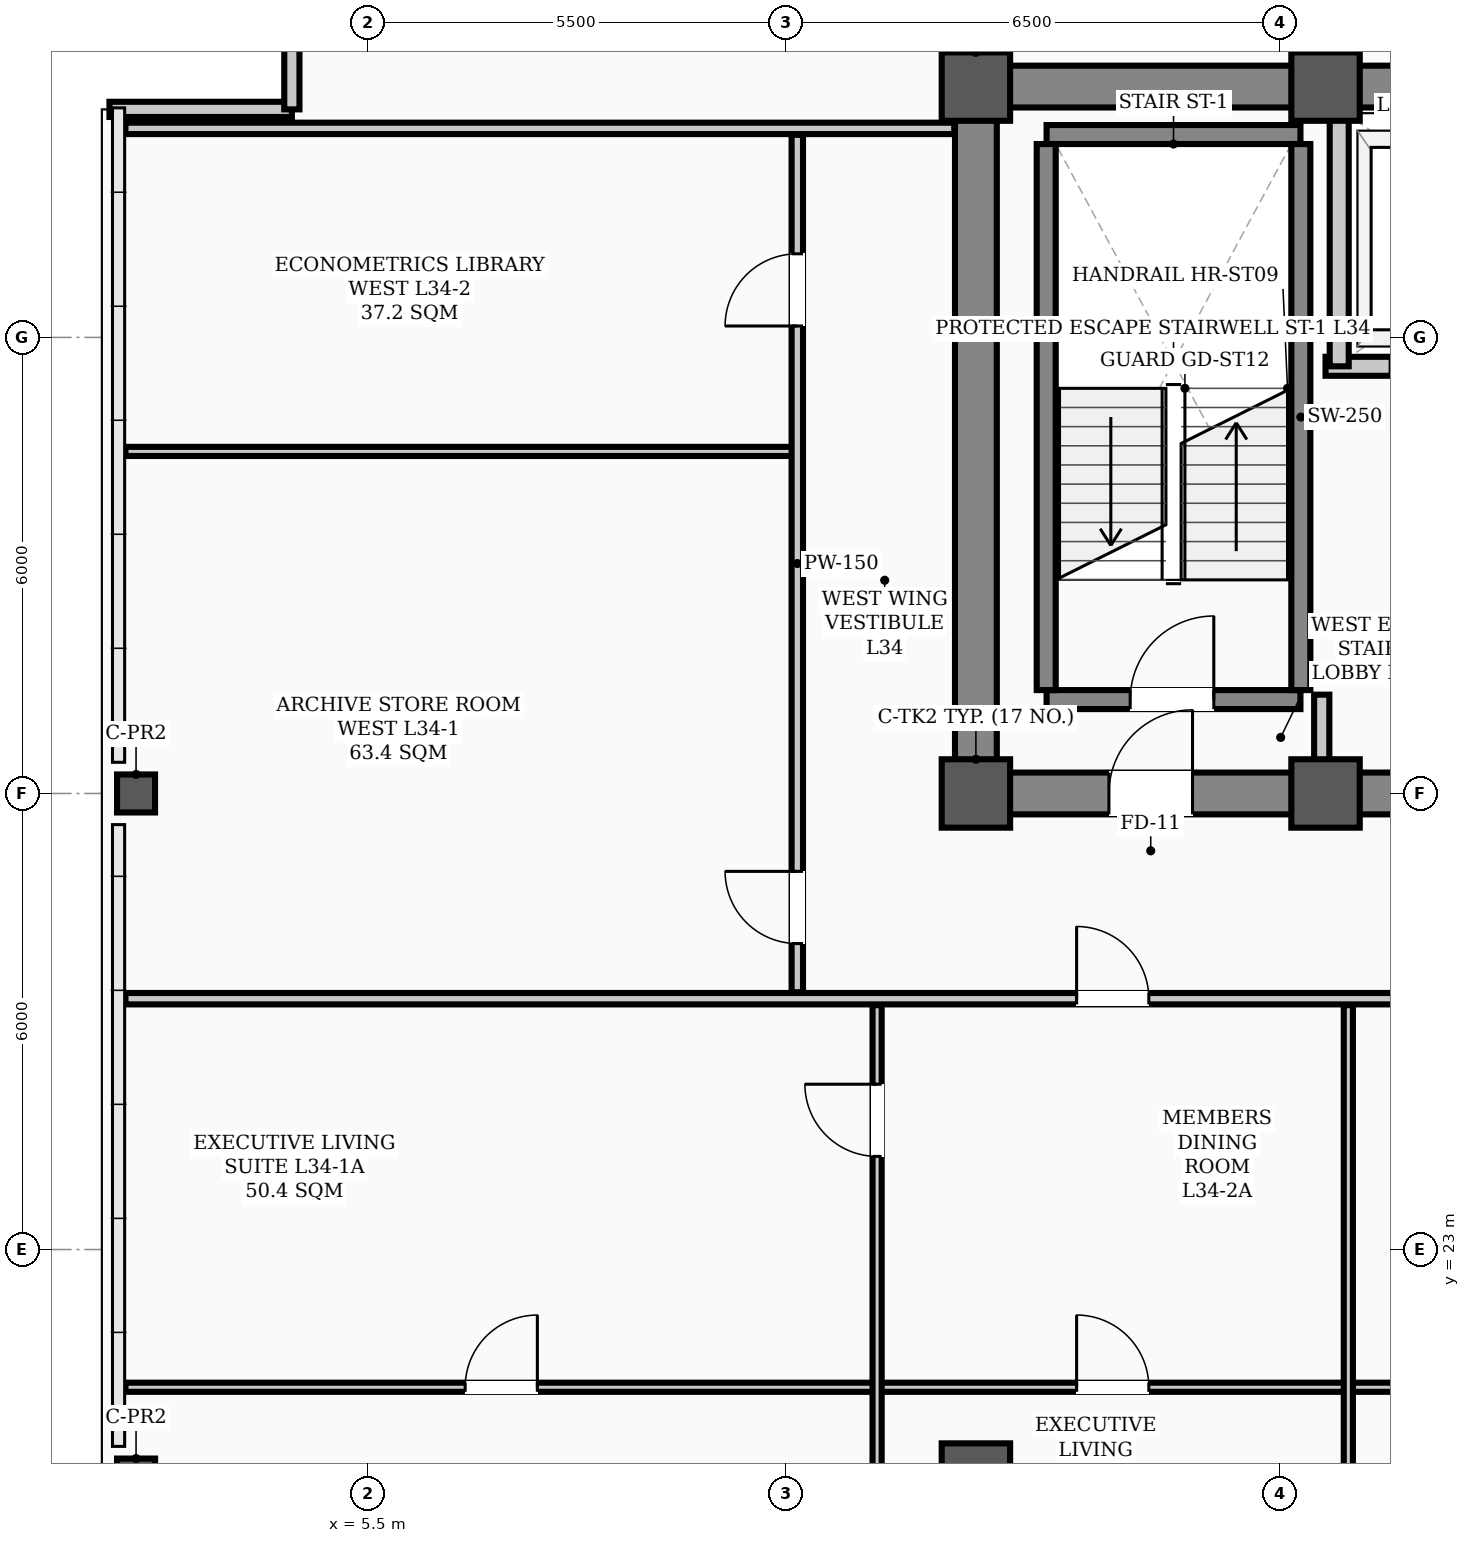
"""IFC4 building model, lengths in metres.
Left out: names, types, materials, properties, quantities, classifications, styles, units other than length and angle.
Written with IfcOpenShell. Run it as: python <this file> out.ifc"""

import sys

from ifc_helpers import new_model, si_unit, direction, frame, frame_2d, origin, origin_2d, place, context, subcontext, project, spatial, rectangle, hollow_rectangle, extrude, element, fill, save


model = new_model("IFC4")
c1 = context("Model", 3, precision=1e-05, world=origin(), true_north=direction((0.0, 1.0)))
c2 = subcontext(c1, "Body", "Model", "MODEL_VIEW")
j1 = project(units=[si_unit("LENGTHUNIT", "METRE"), si_unit("PLANEANGLEUNIT", "RADIAN")], contexts=[c1])
p1 = place(None, origin())
s1 = spatial("IfcSite", under=j1, at=p1, CompositionType="ELEMENT")
p2 = place(p1, origin())
s2 = spatial("IfcBuilding", under=s1, at=p2, CompositionType="ELEMENT")
p3 = place(p2, frame((0.0, 0.0, 138.3)))
s3 = spatial("IfcBuildingStorey", under=s2, at=p3, CompositionType="ELEMENT", Elevation=138.3)
for number, where, z_axis, x_axis in (
    (1, (13.5, 29.0, 0.0), (0.0, 0.0, 1.0), (1.0, 0.0, 0.0)),
    (2, (13.5, 38.3, 0.0), (0.0, 0.0, 1.0), (1.0, 0.0, 0.0)),
    (3, (18.1, 29.0, 0.0), (0.0, 0.0, 1.0), (1.0, 0.0, 0.0)),
    (4, (18.1, 38.3, 0.0), (0.0, 0.0, 1.0), (1.0, 0.0, 0.0)),
    (5, (13.5, 20.0, 0.0), (0.0, 0.0, 1.0), (1.0, 0.0, 0.0)),
):
    element("IfcColumn", number, at=place(p3, frame(where, z_axis=z_axis, x_axis=x_axis)), inside=s3, PredefinedType="COLUMN", context=c2, shape_type="SweptSolid", body=[
        extrude(hollow_rectangle(XDim=0.9, YDim=0.9, WallThickness=0.035, InnerFilletRadius=0.017, OuterFilletRadius=0.052, at=origin_2d()), origin(), (0.0, 0.0, 1.0), 3.9),
    ])
for number, where, z_axis, x_axis in (
    (6, (2.45, 20.0, 0.0), (0.0, 0.0, 1.0), (1.0, 0.0, 0.0)),
    (7, (2.45, 29.0, 0.0), (0.0, 0.0, 1.0), (1.0, 0.0, 0.0)),
):
    element("IfcColumn", number, at=place(p3, frame(where, z_axis=z_axis, x_axis=x_axis)), inside=s3, PredefinedType="COLUMN", context=c2, shape_type="SweptSolid", body=[
        extrude(hollow_rectangle(XDim=0.5, YDim=0.5, WallThickness=0.024, InnerFilletRadius=0.012, OuterFilletRadius=0.036, at=origin_2d()), origin(), (0.0, 0.0, 1.0), 3.9),
    ])
for number, where, z_axis, x_axis in (
    (8, (2.1, 38.0, 0.0), (0.0, 0.0, 1.0), (1.0, 0.0, 0.0)),
    (9, (4.5, 38.0, 0.0), (0.0, 0.0, 1.0), (0.0, 1.0, 0.0)),
):
    element("IfcWall", number, at=place(p3, frame(where, z_axis=z_axis, x_axis=x_axis)), inside=s3, PredefinedType="PARAPET", context=c2, shape_type="SweptSolid", body=[
        extrude(rectangle(XDim=2.4, YDim=0.2, at=frame_2d((1.2, 0.0))), origin(), (0.0, 0.0, 1.0), 1.2),
    ])
p4 = place(p3, frame((13.5, 29.0, 0.0), z_axis=(0.0, 0.0, 1.0), x_axis=(1.0, 0.0, 0.0)))
e10 = element("IfcWall", 10, at=p4, inside=s3, PredefinedType="SHEAR", context=c2, shape_type="SweptSolid", body=[
    extrude(rectangle(XDim=30.5, YDim=0.55, at=frame_2d((15.25, 0.0))), origin(), (0.0, 0.0, 1.0), 3.66),
])
p5 = place(p4, frame((1.75, 0.0, 0.0)))
e11 = element("IfcOpeningElement", 11, at=p5, cuts=e10, PredefinedType="OPENING", context=c2, shape_type="SweptSolid", body=[
    extrude(rectangle(XDim=1.1, YDim=2.08, at=frame_2d((0.55, 1.04))), frame((0.0, 0.285, 0.0), z_axis=(0.0, -1.0, 0.0), x_axis=(1.0, 0.0, 0.0)), (0.0, 0.0, 1.0), 0.57),
])
p6 = place(p4, frame((26.7, 0.0, 0.0)))
e12 = element("IfcOpeningElement", 12, at=p6, cuts=e10, PredefinedType="OPENING", context=c2, shape_type="SweptSolid", body=[
    extrude(rectangle(XDim=1.1, YDim=2.08, at=frame_2d((0.55, 1.04))), frame((0.0, 0.285, 0.0), z_axis=(0.0, -1.0, 0.0), x_axis=(1.0, 0.0, 0.0)), (0.0, 0.0, 1.0), 0.57),
])
p7 = place(p4, frame((6.8, 0.0, 0.0)))
e13 = element("IfcOpeningElement", 13, at=p7, cuts=e10, PredefinedType="OPENING", context=c2, shape_type="SweptSolid", body=[
    extrude(rectangle(XDim=1.1, YDim=2.08, at=frame_2d((0.55, 1.04))), frame((0.0, 0.285, 0.0), z_axis=(0.0, -1.0, 0.0), x_axis=(1.0, 0.0, 0.0)), (0.0, 0.0, 1.0), 0.57),
])
p8 = place(p4, frame((13.2, 0.0, 0.0)))
e14 = element("IfcOpeningElement", 14, at=p8, cuts=e10, PredefinedType="OPENING", context=c2, shape_type="SweptSolid", body=[
    extrude(rectangle(XDim=1.6, YDim=2.08, at=frame_2d((0.8, 1.04))), frame((0.0, 0.285, 0.0), z_axis=(0.0, -1.0, 0.0), x_axis=(1.0, 0.0, 0.0)), (0.0, 0.0, 1.0), 0.57),
])
p9 = place(p4, frame((20.525, 0.0, 0.0)))
e15 = element("IfcOpeningElement", 15, at=p9, cuts=e10, PredefinedType="OPENING", context=c2, shape_type="SweptSolid", body=[
    extrude(rectangle(XDim=0.95, YDim=2.08, at=frame_2d((0.475, 1.04))), frame((0.0, 0.285, 0.0), z_axis=(0.0, -1.0, 0.0), x_axis=(1.0, 0.0, 0.0)), (0.0, 0.0, 1.0), 0.57),
])
p10 = place(p3, frame((13.5, 38.3, 0.0), z_axis=(0.0, 0.0, 1.0), x_axis=(1.0, 0.0, 0.0)))
e16 = element("IfcWall", 16, at=p10, inside=s3, PredefinedType="SHEAR", context=c2, shape_type="SweptSolid", body=[
    extrude(rectangle(XDim=30.5, YDim=0.55, at=frame_2d((15.25, 0.0))), origin(), (0.0, 0.0, 1.0), 3.66),
])
p11 = place(p3, frame((13.5, 29.35, 0.0), z_axis=(0.0, 0.0, 1.0), x_axis=(0.0, 1.0, 0.0)))
e17 = element("IfcWall", 17, at=p11, inside=s3, PredefinedType="SHEAR", context=c2, shape_type="SweptSolid", body=[
    extrude(rectangle(XDim=8.6, YDim=0.55, at=frame_2d((4.3, 0.0))), origin(), (0.0, 0.0, 1.0), 3.66),
])
p12 = place(p3, frame((14.43, 30.235, 0.0), z_axis=(0.0, 0.0, 1.0), x_axis=(1.0, 0.0, 0.0)))
e18 = element("IfcWall", 18, at=p12, inside=s3, PredefinedType="STANDARD", context=c2, shape_type="SweptSolid", body=[
    extrude(rectangle(XDim=3.34, YDim=0.25, at=frame_2d((1.67, 0.0))), origin(), (0.0, 0.0, 1.0), 3.66),
])
p13 = place(p12, frame((1.1, 0.0, 0.0)))
e19 = element("IfcOpeningElement", 19, at=p13, cuts=e18, PredefinedType="OPENING", context=c2, shape_type="SweptSolid", body=[
    extrude(rectangle(XDim=1.1, YDim=2.08, at=frame_2d((0.55, 1.04))), frame((0.0, 0.135, 0.0), z_axis=(0.0, -1.0, 0.0), x_axis=(1.0, 0.0, 0.0)), (0.0, 0.0, 1.0), 0.27),
])
p14 = place(p3, frame((14.43, 37.669, 0.0), z_axis=(0.0, 0.0, 1.0), x_axis=(1.0, 0.0, 0.0)))
e20 = element("IfcWall", 20, at=p14, inside=s3, PredefinedType="STANDARD", context=c2, shape_type="SweptSolid", body=[
    extrude(rectangle(XDim=3.34, YDim=0.25, at=frame_2d((1.67, 0.0))), origin(), (0.0, 0.0, 1.0), 3.66),
])
for number, where, z_axis, x_axis in (
    (21, (14.425, 30.36, 0.0), (0.0, 0.0, 1.0), (0.0, 1.0, 0.0)),
    (22, (17.775, 30.36, 0.0), (0.0, 0.0, 1.0), (0.0, 1.0, 0.0)),
):
    element("IfcWall", number, at=place(p3, frame(where, z_axis=z_axis, x_axis=x_axis)), inside=s3, PredefinedType="STANDARD", context=c2, shape_type="SweptSolid", body=[
        extrude(rectangle(XDim=7.184, YDim=0.25, at=frame_2d((3.592, 0.0))), origin(), (0.0, 0.0, 1.0), 3.66),
    ])
p15 = place(p3, frame((18.1, 34.62, 0.0), z_axis=(0.0, 0.0, 1.0), x_axis=(1.0, 0.0, 0.0)))
e23 = element("IfcWall", 23, at=p15, inside=s3, PredefinedType="STANDARD", context=c2, shape_type="SweptSolid", body=[
    extrude(rectangle(XDim=5.35, YDim=0.25, at=frame_2d((2.675, 0.0))), origin(), (0.0, 0.0, 1.0), 3.66),
])
p16 = place(p15, frame((0.85, 0.0, 0.0)))
e24 = element("IfcOpeningElement", 24, at=p16, cuts=e23, PredefinedType="OPENING", context=c2, shape_type="SweptSolid", body=[
    extrude(rectangle(XDim=1.1, YDim=2.08, at=frame_2d((0.55, 1.04))), frame((0.0, 0.135, 0.0), z_axis=(0.0, -1.0, 0.0), x_axis=(1.0, 0.0, 0.0)), (0.0, 0.0, 1.0), 0.27),
])
p17 = place(p15, frame((3.45, 0.0, 0.0)))
e25 = element("IfcOpeningElement", 25, at=p17, cuts=e23, PredefinedType="OPENING", context=c2, shape_type="SweptSolid", body=[
    extrude(rectangle(XDim=1.1, YDim=2.08, at=frame_2d((0.55, 1.04))), frame((0.0, 0.135, 0.0), z_axis=(0.0, -1.0, 0.0), x_axis=(1.0, 0.0, 0.0)), (0.0, 0.0, 1.0), 0.27),
])
p18 = place(p3, frame((18.28, 34.62, 0.0), z_axis=(0.0, 0.0, 1.0), x_axis=(0.0, 1.0, 0.0)))
e26 = element("IfcWall", 26, at=p18, inside=s3, PredefinedType="STANDARD", context=c2, shape_type="SweptSolid", body=[
    extrude(rectangle(XDim=3.33, YDim=0.25, at=frame_2d((1.665, 0.0))), origin(), (0.0, 0.0, 1.0), 2.24),
])
p19 = place(p3, frame((2.31, 26.3, 0.0), z_axis=(0.0, 0.0, 1.0), x_axis=(1.0, 0.0, 0.0)))
e27 = element("IfcWall", 27, at=p19, inside=s3, PredefinedType="PARTITIONING", context=c2, shape_type="SweptSolid", body=[
    extrude(rectangle(XDim=46.38, YDim=0.15, at=frame_2d((23.19, 0.0))), origin(), (0.0, 0.0, 1.0), 2.24),
])
p20 = place(p19, frame((12.515, 0.0, 0.0)))
e28 = element("IfcOpeningElement", 28, at=p20, cuts=e27, PredefinedType="OPENING", context=c2, shape_type="SweptSolid", body=[
    extrude(rectangle(XDim=0.95, YDim=2.08, at=frame_2d((0.475, 1.04))), frame((0.0, 0.085, 0.0), z_axis=(0.0, -1.0, 0.0), x_axis=(1.0, 0.0, 0.0)), (0.0, 0.0, 1.0), 0.17),
])
p21 = place(p19, frame((18.615, 0.0, 0.0)))
e29 = element("IfcOpeningElement", 29, at=p21, cuts=e27, PredefinedType="OPENING", context=c2, shape_type="SweptSolid", body=[
    extrude(rectangle(XDim=0.95, YDim=2.08, at=frame_2d((0.475, 1.04))), frame((0.0, 0.085, 0.0), z_axis=(0.0, -1.0, 0.0), x_axis=(1.0, 0.0, 0.0)), (0.0, 0.0, 1.0), 0.17),
])
p22 = place(p19, frame((26.115, 0.0, 0.0)))
e30 = element("IfcOpeningElement", 30, at=p22, cuts=e27, PredefinedType="OPENING", context=c2, shape_type="SweptSolid", body=[
    extrude(rectangle(XDim=0.95, YDim=2.08, at=frame_2d((0.475, 1.04))), frame((0.0, 0.085, 0.0), z_axis=(0.0, -1.0, 0.0), x_axis=(1.0, 0.0, 0.0)), (0.0, 0.0, 1.0), 0.17),
])
p23 = place(p19, frame((31.665, 0.0, 0.0)))
e31 = element("IfcOpeningElement", 31, at=p23, cuts=e27, PredefinedType="OPENING", context=c2, shape_type="SweptSolid", body=[
    extrude(rectangle(XDim=0.95, YDim=2.08, at=frame_2d((0.475, 1.04))), frame((0.0, 0.085, 0.0), z_axis=(0.0, -1.0, 0.0), x_axis=(1.0, 0.0, 0.0)), (0.0, 0.0, 1.0), 0.17),
])
p24 = place(p19, frame((43.06, 0.0, 0.0)))
e32 = element("IfcOpeningElement", 32, at=p24, cuts=e27, PredefinedType="OPENING", context=c2, shape_type="SweptSolid", body=[
    extrude(rectangle(XDim=0.95, YDim=2.08, at=frame_2d((0.475, 1.04))), frame((0.0, 0.085, 0.0), z_axis=(0.0, -1.0, 0.0), x_axis=(1.0, 0.0, 0.0)), (0.0, 0.0, 1.0), 0.17),
])
p25 = place(p3, frame((2.31, 37.75, 0.0), z_axis=(0.0, 0.0, 1.0), x_axis=(1.0, 0.0, 0.0)))
e33 = element("IfcWall", 33, at=p25, inside=s3, PredefinedType="PARTITIONING", context=c2, shape_type="SweptSolid", body=[
    extrude(rectangle(XDim=10.905, YDim=0.15, at=frame_2d((5.453, 0.0))), origin(), (0.0, 0.0, 1.0), 2.24),
])
p26 = place(p3, frame((2.31, 21.188, 0.0), z_axis=(0.0, 0.0, 1.0), x_axis=(1.0, 0.0, 0.0)))
e34 = element("IfcWall", 34, at=p26, inside=s3, PredefinedType="PARTITIONING", context=c2, shape_type="SweptSolid", body=[
    extrude(rectangle(XDim=9.89, YDim=0.12, at=frame_2d((4.945, 0.0))), origin(), (0.0, 0.0, 1.0), 2.24),
])
p27 = place(p26, frame((4.47, 0.0, 0.0)))
e35 = element("IfcOpeningElement", 35, at=p27, cuts=e34, PredefinedType="OPENING", context=c2, shape_type="SweptSolid", body=[
    extrude(rectangle(XDim=0.95, YDim=2.08, at=frame_2d((0.475, 1.04))), frame((0.0, 0.07, 0.0), z_axis=(0.0, -1.0, 0.0), x_axis=(1.0, 0.0, 0.0)), (0.0, 0.0, 1.0), 0.14),
])
p28 = place(p3, frame((12.2, 21.188, 0.0), z_axis=(0.0, 0.0, 1.0), x_axis=(1.0, 0.0, 0.0)))
e36 = element("IfcWall", 36, at=p28, inside=s3, PredefinedType="PARTITIONING", context=c2, shape_type="SweptSolid", body=[
    extrude(rectangle(XDim=6.2, YDim=0.12, at=frame_2d((3.1, 0.0))), origin(), (0.0, 0.0, 1.0), 2.24),
])
p29 = place(p28, frame((2.625, 0.0, 0.0)))
e37 = element("IfcOpeningElement", 37, at=p29, cuts=e36, PredefinedType="OPENING", context=c2, shape_type="SweptSolid", body=[
    extrude(rectangle(XDim=0.95, YDim=2.08, at=frame_2d((0.475, 1.04))), frame((0.0, 0.07, 0.0), z_axis=(0.0, -1.0, 0.0), x_axis=(1.0, 0.0, 0.0)), (0.0, 0.0, 1.0), 0.14),
])
p30 = place(p3, frame((18.4, 21.188, 0.0), z_axis=(0.0, 0.0, 1.0), x_axis=(1.0, 0.0, 0.0)))
e38 = element("IfcWall", 38, at=p30, inside=s3, PredefinedType="PARTITIONING", context=c2, shape_type="SweptSolid", body=[
    extrude(rectangle(XDim=6.0, YDim=0.12, at=frame_2d((3.0, 0.0))), origin(), (0.0, 0.0, 1.0), 2.24),
])
p31 = place(p30, frame((2.525, 0.0, 0.0)))
e39 = element("IfcOpeningElement", 39, at=p31, cuts=e38, PredefinedType="OPENING", context=c2, shape_type="SweptSolid", body=[
    extrude(rectangle(XDim=0.95, YDim=2.08, at=frame_2d((0.475, 1.04))), frame((0.0, 0.07, 0.0), z_axis=(0.0, -1.0, 0.0), x_axis=(1.0, 0.0, 0.0)), (0.0, 0.0, 1.0), 0.14),
])
p32 = place(p3, frame((2.31, 33.5, 0.0), z_axis=(0.0, 0.0, 1.0), x_axis=(1.0, 0.0, 0.0)))
e40 = element("IfcWall", 40, at=p32, inside=s3, PredefinedType="PARTITIONING", context=c2, shape_type="SweptSolid", body=[
    extrude(rectangle(XDim=8.84, YDim=0.12, at=frame_2d((4.42, 0.0))), origin(), (0.0, 0.0, 1.0), 3.66),
])
p33 = place(p3, frame((18.05, 29.285, 0.0), z_axis=(0.0, 0.0, 1.0), x_axis=(0.0, 1.0, 0.0)))
e41 = element("IfcWall", 41, at=p33, inside=s3, PredefinedType="STANDARD", context=c2, shape_type="SweptSolid", body=[
    extrude(rectangle(XDim=1.015, YDim=0.2, at=frame_2d((0.508, 0.0))), origin(), (0.0, 0.0, 1.0), 2.24),
])
p34 = place(p3, frame((11.15, 26.385, 0.0), z_axis=(0.0, 0.0, 1.0), x_axis=(0.0, 1.0, 0.0)))
e42 = element("IfcWall", 42, at=p34, inside=s3, PredefinedType="PARTITIONING", context=c2, shape_type="SweptSolid", body=[
    extrude(rectangle(XDim=11.28, YDim=0.15, at=frame_2d((5.64, 0.0))), origin(), (0.0, 0.0, 1.0), 2.24),
])
p35 = place(p34, frame((0.64, 0.0, 0.0)))
e43 = element("IfcOpeningElement", 43, at=p35, cuts=e42, PredefinedType="OPENING", context=c2, shape_type="SweptSolid", body=[
    extrude(rectangle(XDim=0.95, YDim=2.08, at=frame_2d((0.475, 1.04))), frame((0.0, 0.085, 0.0), z_axis=(0.0, -1.0, 0.0), x_axis=(1.0, 0.0, 0.0)), (0.0, 0.0, 1.0), 0.17),
])
p36 = place(p34, frame((8.765, 0.0, 0.0)))
e44 = element("IfcOpeningElement", 44, at=p36, cuts=e42, PredefinedType="OPENING", context=c2, shape_type="SweptSolid", body=[
    extrude(rectangle(XDim=0.95, YDim=2.08, at=frame_2d((0.475, 1.04))), frame((0.0, 0.085, 0.0), z_axis=(0.0, -1.0, 0.0), x_axis=(1.0, 0.0, 0.0)), (0.0, 0.0, 1.0), 0.17),
])
p37 = place(p3, frame((12.2, 10.81, 0.0), z_axis=(0.0, 0.0, 1.0), x_axis=(0.0, 1.0, 0.0)))
e45 = element("IfcWall", 45, at=p37, inside=s3, PredefinedType="PARTITIONING", context=c2, shape_type="SweptSolid", body=[
    extrude(rectangle(XDim=15.405, YDim=0.12, at=frame_2d((7.703, 0.0))), origin(), (0.0, 0.0, 1.0), 2.24),
])
p38 = place(p37, frame((13.415, 0.0, 0.0)))
e46 = element("IfcOpeningElement", 46, at=p38, cuts=e45, PredefinedType="OPENING", context=c2, shape_type="SweptSolid", body=[
    extrude(rectangle(XDim=0.95, YDim=2.08, at=frame_2d((0.475, 1.04))), frame((0.0, 0.07, 0.0), z_axis=(0.0, -1.0, 0.0), x_axis=(1.0, 0.0, 0.0)), (0.0, 0.0, 1.0), 0.14),
])
p39 = place(p3, frame((18.4, 10.81, 0.0), z_axis=(0.0, 0.0, 1.0), x_axis=(0.0, 1.0, 0.0)))
e47 = element("IfcWall", 47, at=p39, inside=s3, PredefinedType="PARTITIONING", context=c2, shape_type="SweptSolid", body=[
    extrude(rectangle(XDim=15.405, YDim=0.12, at=frame_2d((7.703, 0.0))), origin(), (0.0, 0.0, 1.0), 2.24),
])
p40 = place(p13, origin())
e48 = element("IfcDoor", 48, at=p40, inside=s3, OperationType="SINGLE_SWING_RIGHT", PredefinedType="DOOR", context=c2, shape_type="SweptSolid", body=[
    extrude(rectangle(XDim=1.1, YDim=2.08, at=frame_2d((0.55, 1.04))), frame((0.0, 0.025, 0.0), z_axis=(0.0, -1.0, 0.0), x_axis=(1.0, 0.0, 0.0)), (0.0, 0.0, 1.0), 0.05),
])
fill(e19, e48)
p41 = place(p5, origin())
e49 = element("IfcDoor", 49, at=p41, inside=s3, OperationType="SINGLE_SWING_RIGHT", PredefinedType="DOOR", context=c2, shape_type="SweptSolid", body=[
    extrude(rectangle(XDim=1.1, YDim=2.08, at=frame_2d((0.55, 1.04))), frame((0.0, 0.025, 0.0), z_axis=(0.0, -1.0, 0.0), x_axis=(1.0, 0.0, 0.0)), (0.0, 0.0, 1.0), 0.05),
])
fill(e11, e49)
p42 = place(p27, origin())
e50 = element("IfcDoor", 50, at=p42, inside=s3, OperationType="SINGLE_SWING_RIGHT", PredefinedType="DOOR", context=c2, shape_type="SweptSolid", body=[
    extrude(rectangle(XDim=0.95, YDim=2.08, at=frame_2d((0.475, 1.04))), frame((0.0, 0.025, 0.0), z_axis=(0.0, -1.0, 0.0), x_axis=(1.0, 0.0, 0.0)), (0.0, 0.0, 1.0), 0.05),
])
fill(e35, e50)
p43 = place(p38, origin())
e51 = element("IfcDoor", 51, at=p43, inside=s3, OperationType="SINGLE_SWING_RIGHT", PredefinedType="DOOR", context=c2, shape_type="SweptSolid", body=[
    extrude(rectangle(XDim=0.95, YDim=2.08, at=frame_2d((0.475, 1.04))), frame((0.0, 0.025, 0.0), z_axis=(0.0, -1.0, 0.0), x_axis=(1.0, 0.0, 0.0)), (0.0, 0.0, 1.0), 0.05),
])
fill(e46, e51)
p44 = place(p29, origin())
e52 = element("IfcDoor", 52, at=p44, inside=s3, OperationType="SINGLE_SWING_LEFT", PredefinedType="DOOR", context=c2, shape_type="SweptSolid", body=[
    extrude(rectangle(XDim=0.95, YDim=2.08, at=frame_2d((0.475, 1.04))), frame((0.0, 0.025, 0.0), z_axis=(0.0, -1.0, 0.0), x_axis=(1.0, 0.0, 0.0)), (0.0, 0.0, 1.0), 0.05),
])
fill(e37, e52)
p45 = place(p20, origin())
e53 = element("IfcDoor", 53, at=p45, inside=s3, OperationType="SINGLE_SWING_LEFT", PredefinedType="DOOR", context=c2, shape_type="SweptSolid", body=[
    extrude(rectangle(XDim=0.95, YDim=2.08, at=frame_2d((0.475, 1.04))), frame((0.0, 0.025, 0.0), z_axis=(0.0, -1.0, 0.0), x_axis=(1.0, 0.0, 0.0)), (0.0, 0.0, 1.0), 0.05),
])
fill(e28, e53)
p46 = place(p35, origin())
e54 = element("IfcDoor", 54, at=p46, inside=s3, OperationType="SINGLE_SWING_RIGHT", PredefinedType="DOOR", context=c2, shape_type="SweptSolid", body=[
    extrude(rectangle(XDim=0.95, YDim=2.08, at=frame_2d((0.475, 1.04))), frame((0.0, 0.025, 0.0), z_axis=(0.0, -1.0, 0.0), x_axis=(1.0, 0.0, 0.0)), (0.0, 0.0, 1.0), 0.05),
])
fill(e43, e54)
p47 = place(p36, origin())
e55 = element("IfcDoor", 55, at=p47, inside=s3, OperationType="SINGLE_SWING_LEFT", PredefinedType="DOOR", context=c2, shape_type="SweptSolid", body=[
    extrude(rectangle(XDim=0.95, YDim=2.08, at=frame_2d((0.475, 1.04))), frame((0.0, 0.025, 0.0), z_axis=(0.0, -1.0, 0.0), x_axis=(1.0, 0.0, 0.0)), (0.0, 0.0, 1.0), 0.05),
])
fill(e44, e55)
save(model, sys.argv[1])
